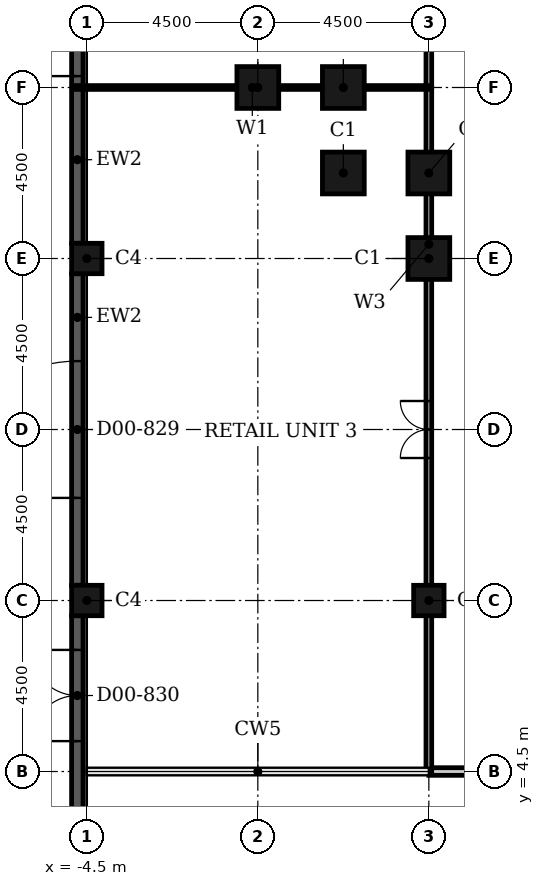
"""IFC4 building model, lengths in metres.
Left out: names, types, materials, properties, quantities, classifications, styles, units other than length and angle.
Written with IfcOpenShell. Run it as: python <this file> out.ifc"""

import sys

from ifc_helpers import new_model, si_unit, direction, frame, frame_2d, origin, origin_2d, place, context, subcontext, project, spatial, rectangle, hollow_rectangle, extrude, element, fill, save


model = new_model("IFC4")
c1 = context("Model", 3, precision=1e-05, world=origin(), true_north=direction((0.0, 1.0)))
c2 = subcontext(c1, "Body", "Model", "MODEL_VIEW")
j1 = project(units=[si_unit("LENGTHUNIT", "METRE"), si_unit("PLANEANGLEUNIT", "RADIAN")], contexts=[c1])
p1 = place(None, origin())
s1 = spatial("IfcSite", under=j1, at=p1, CompositionType="ELEMENT")
p2 = place(p1, origin())
s2 = spatial("IfcBuilding", under=s1, at=p2, CompositionType="ELEMENT")
p3 = place(p2, origin())
s3 = spatial("IfcBuildingStorey", under=s2, at=p3, CompositionType="ELEMENT", Elevation=0.0)
for number, where, z_axis, x_axis in (
    (1, (0.0, 22.5, 0.0), (0.0, 0.0, 1.0), (1.0, 0.0, 0.0)),
    (2, (2.25, 22.5, 0.0), (0.0, 0.0, 1.0), (1.0, 0.0, 0.0)),
    (3, (2.25, 20.25, 0.0), (0.0, 0.0, 1.0), (1.0, 0.0, 0.0)),
    (4, (4.5, 20.25, 0.0), (0.0, 0.0, 1.0), (1.0, 0.0, 0.0)),
    (5, (4.5, 18.0, 0.0), (0.0, 0.0, 1.0), (1.0, 0.0, 0.0)),
):
    element("IfcColumn", number, at=place(p3, frame(where, z_axis=z_axis, x_axis=x_axis)), inside=s3, PredefinedType="COLUMN", context=c2, shape_type="SweptSolid", body=[
        extrude(hollow_rectangle(XDim=1.1, YDim=1.1, WallThickness=0.036, at=origin_2d()), origin(), (0.0, 0.0, 1.0), 6.6),
    ])
for number, where, z_axis, x_axis in (
    (6, (-4.5, 9.0, 0.0), (0.0, 0.0, 1.0), (1.0, 0.0, 0.0)),
    (7, (-4.5, 18.0, 0.0), (0.0, 0.0, 1.0), (1.0, 0.0, 0.0)),
    (8, (4.5, 9.0, 0.0), (0.0, 0.0, 1.0), (1.0, 0.0, 0.0)),
):
    element("IfcColumn", number, at=place(p3, frame(where, z_axis=z_axis, x_axis=x_axis)), inside=s3, PredefinedType="COLUMN", context=c2, shape_type="SweptSolid", body=[
        extrude(hollow_rectangle(XDim=0.8, YDim=0.8, WallThickness=0.025, at=origin_2d()), origin(), (0.0, 0.0, 1.0), 6.6),
    ])
p4 = place(p3, frame((-4.75, 18.4, 0.0), z_axis=(0.0, 0.0, 1.0), x_axis=(0.0, 1.0, 0.0)))
e9 = element("IfcWall", 9, at=p4, inside=s3, PredefinedType="SOLIDWALL", context=c2, shape_type="SweptSolid", body=[
    extrude(rectangle(XDim=8.2, YDim=0.3, at=frame_2d((4.1, 0.0))), origin(), (0.0, 0.0, 1.0), 6.6),
])
p5 = place(p4, frame((4.4, 0.0, 0.0)))
e10 = element("IfcOpeningElement", 10, at=p5, cuts=e9, PredefinedType="OPENING", context=c2, shape_type="SweptSolid", body=[
    extrude(rectangle(XDim=2.4, YDim=2.4, at=frame_2d((1.2, 1.2))), frame((0.0, 0.16, 0.0), z_axis=(0.0, -1.0, 0.0), x_axis=(1.0, 0.0, 0.0)), (0.0, 0.0, 1.0), 0.32),
])
p6 = place(p3, frame((-4.75, 9.4, 0.0), z_axis=(0.0, 0.0, 1.0), x_axis=(0.0, 1.0, 0.0)))
e11 = element("IfcWall", 11, at=p6, inside=s3, PredefinedType="SOLIDWALL", context=c2, shape_type="SweptSolid", body=[
    extrude(rectangle(XDim=8.2, YDim=0.3, at=frame_2d((4.1, 0.0))), origin(), (0.0, 0.0, 1.0), 6.6),
])
p7 = place(p6, frame((2.3, 0.0, 0.0)))
e12 = element("IfcOpeningElement", 12, at=p7, cuts=e11, PredefinedType="OPENING", context=c2, shape_type="SweptSolid", body=[
    extrude(rectangle(XDim=3.6, YDim=4.2, at=frame_2d((1.8, 2.1))), frame((0.0, 0.16, 0.0), z_axis=(0.0, -1.0, 0.0), x_axis=(1.0, 0.0, 0.0)), (0.0, 0.0, 1.0), 0.32),
])
p8 = place(p3, frame((-4.75, 0.4, 0.0), z_axis=(0.0, 0.0, 1.0), x_axis=(0.0, 1.0, 0.0)))
e13 = element("IfcWall", 13, at=p8, inside=s3, PredefinedType="SOLIDWALL", context=c2, shape_type="SweptSolid", body=[
    extrude(rectangle(XDim=8.2, YDim=0.3, at=frame_2d((4.1, 0.0))), origin(), (0.0, 0.0, 1.0), 6.6),
])
p9 = place(p8, frame((4.9, 0.0, 0.0)))
e14 = element("IfcOpeningElement", 14, at=p9, cuts=e13, PredefinedType="OPENING", context=c2, shape_type="SweptSolid", body=[
    extrude(rectangle(XDim=2.4, YDim=2.4, at=frame_2d((1.2, 1.2))), frame((0.0, 0.16, 0.0), z_axis=(0.0, -1.0, 0.0), x_axis=(1.0, 0.0, 0.0)), (0.0, 0.0, 1.0), 0.32),
])
p10 = place(p3, frame((13.5, 4.5, 0.0), z_axis=(0.0, 0.0, 1.0), x_axis=(-1.0, 0.0, 0.0)))
e15 = element("IfcWall", 15, at=p10, inside=s3, PredefinedType="SOLIDWALL", context=c2, shape_type="SweptSolid", body=[
    extrude(rectangle(XDim=9.0, YDim=0.2, at=frame_2d((4.5, 0.0))), origin(), (0.0, 0.0, 1.0), 6.25),
])
p11 = place(p10, frame((3.3, 0.0, 0.0)))
e16 = element("IfcOpeningElement", 16, at=p11, cuts=e15, PredefinedType="OPENING", context=c2, shape_type="SweptSolid", body=[
    extrude(rectangle(XDim=2.4, YDim=2.4, at=frame_2d((1.2, 1.2))), frame((0.0, 0.11, 0.0), z_axis=(0.0, -1.0, 0.0), x_axis=(1.0, 0.0, 0.0)), (0.0, 0.0, 1.0), 0.22),
])
p12 = place(p3, frame((4.5, 4.5, 0.0), z_axis=(0.0, 0.0, 1.0), x_axis=(0.0, 1.0, 0.0)))
e17 = element("IfcWall", 17, at=p12, inside=s3, PredefinedType="PARTITIONING", context=c2, shape_type="SweptSolid", body=[
    extrude(rectangle(XDim=18.0, YDim=0.15, at=frame_2d((9.0, 0.0))), origin(), (0.0, 0.0, 1.0), 6.25),
])
p13 = place(p12, frame((8.25, 0.0, 0.0)))
e18 = element("IfcOpeningElement", 18, at=p13, cuts=e17, PredefinedType="OPENING", context=c2, shape_type="SweptSolid", body=[
    extrude(rectangle(XDim=1.5, YDim=2.4, at=frame_2d((0.75, 1.2))), frame((0.0, 0.085, 0.0), z_axis=(0.0, -1.0, 0.0), x_axis=(1.0, 0.0, 0.0)), (0.0, 0.0, 1.0), 0.17),
])
p14 = place(p3, frame((4.5, 22.5, 0.0), z_axis=(0.0, 0.0, 1.0), x_axis=(0.0, 1.0, 0.0)))
e19 = element("IfcWall", 19, at=p14, inside=s3, PredefinedType="PARTITIONING", context=c2, shape_type="SweptSolid", body=[
    extrude(rectangle(XDim=6.3, YDim=0.15, at=frame_2d((3.15, 0.0))), origin(), (0.0, 0.0, 1.0), 6.25),
])
p15 = place(p14, frame((2.4, 0.0, 0.0)))
e20 = element("IfcOpeningElement", 20, at=p15, cuts=e19, PredefinedType="OPENING", context=c2, shape_type="SweptSolid", body=[
    extrude(rectangle(XDim=1.5, YDim=2.4, at=frame_2d((0.75, 1.2))), frame((0.0, 0.085, 0.0), z_axis=(0.0, -1.0, 0.0), x_axis=(1.0, 0.0, 0.0)), (0.0, 0.0, 1.0), 0.17),
])
p16 = place(p3, frame((-4.79, 22.5, 0.0), z_axis=(0.0, 0.0, 1.0), x_axis=(1.0, 0.0, 0.0)))
e21 = element("IfcWall", 21, at=p16, inside=s3, PredefinedType="PARTITIONING", context=c2, shape_type="SweptSolid", body=[
    extrude(rectangle(XDim=9.29, YDim=0.1, at=frame_2d((4.645, 0.0))), origin(), (0.0, 0.0, 1.0), 6.25),
])
p17 = place(p5, origin())
e22 = element("IfcDoor", 22, at=p17, inside=s3, OperationType="DOUBLE_DOOR_SINGLE_SWING", PredefinedType="DOOR", context=c2, shape_type="SweptSolid", body=[
    extrude(rectangle(XDim=2.4, YDim=2.4, at=frame_2d((1.2, 1.2))), frame((0.0, 0.025, 0.0), z_axis=(0.0, -1.0, 0.0), x_axis=(1.0, 0.0, 0.0)), (0.0, 0.0, 1.0), 0.05),
])
fill(e10, e22)
p18 = place(p7, origin())
e23 = element("IfcDoor", 23, at=p18, inside=s3, OperationType="ROLLINGUP", PredefinedType="DOOR", context=c2, shape_type="SweptSolid", body=[
    extrude(rectangle(XDim=3.6, YDim=4.2, at=frame_2d((1.8, 2.1))), frame((0.0, 0.025, 0.0), z_axis=(0.0, -1.0, 0.0), x_axis=(1.0, 0.0, 0.0)), (0.0, 0.0, 1.0), 0.05),
])
fill(e12, e23)
p19 = place(p9, origin())
e24 = element("IfcDoor", 24, at=p19, inside=s3, OperationType="DOUBLE_DOOR_SINGLE_SWING", PredefinedType="DOOR", context=c2, shape_type="SweptSolid", body=[
    extrude(rectangle(XDim=2.4, YDim=2.4, at=frame_2d((1.2, 1.2))), frame((0.0, 0.025, 0.0), z_axis=(0.0, -1.0, 0.0), x_axis=(1.0, 0.0, 0.0)), (0.0, 0.0, 1.0), 0.05),
])
fill(e14, e24)
p20 = place(p13, origin())
e25 = element("IfcDoor", 25, at=p20, inside=s3, OperationType="DOUBLE_DOOR_SINGLE_SWING", PredefinedType="DOOR", context=c2, shape_type="SweptSolid", body=[
    extrude(rectangle(XDim=1.5, YDim=2.4, at=frame_2d((0.75, 1.2))), frame((0.0, 0.025, 0.0), z_axis=(0.0, -1.0, 0.0), x_axis=(1.0, 0.0, 0.0)), (0.0, 0.0, 1.0), 0.05),
])
fill(e18, e25)
save(model, sys.argv[1])
